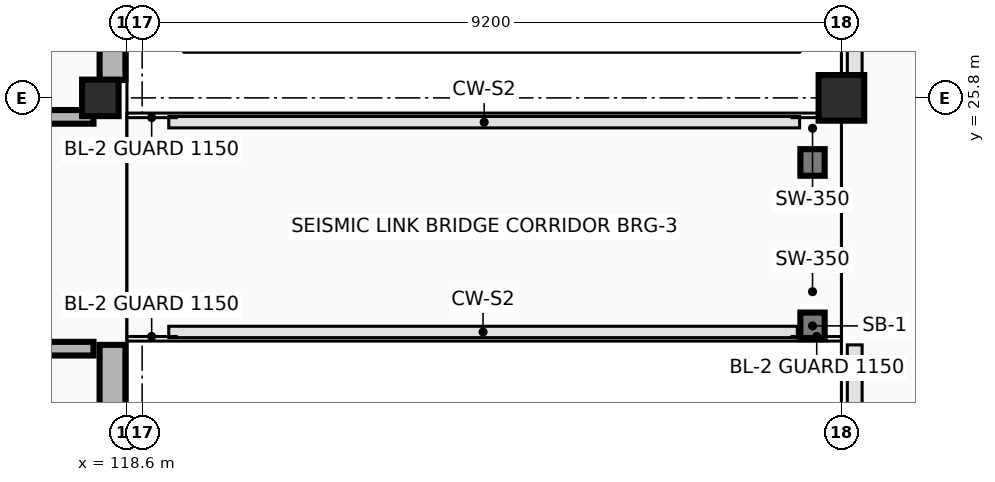
"""IFC4 building model, lengths in metres.
Left out: names, types, materials, properties, quantities, classifications, styles, units other than length and angle.
Written with IfcOpenShell. Run it as: python <this file> out.ifc"""

import sys

from ifc_helpers import new_model, si_unit, direction, frame, frame_2d, origin, origin_2d, place, context, subcontext, project, spatial, rectangle, extrude, element, save


model = new_model("IFC4")
c1 = context("Model", 3, precision=1e-05, world=origin(), true_north=direction((0.0, 1.0)))
c2 = subcontext(c1, "Body", "Model", "MODEL_VIEW")
j1 = project(units=[si_unit("LENGTHUNIT", "METRE"), si_unit("PLANEANGLEUNIT", "RADIAN")], contexts=[c1])
p1 = place(None, origin())
s1 = spatial("IfcSite", under=j1, at=p1, CompositionType="ELEMENT")
p2 = place(p1, origin())
s2 = spatial("IfcBuilding", under=s1, at=p2, CompositionType="ELEMENT")
p3 = place(p2, frame((0.0, 0.0, 9.6)))
s3 = spatial("IfcBuildingStorey", under=s2, at=p3, CompositionType="ELEMENT", Elevation=9.6)
p4 = place(p3, frame((118.25, 25.8, 0.0), z_axis=(0.0, 0.0, 1.0), x_axis=(1.0, 0.0, 0.0)))
e1 = element("IfcColumn", 1, at=p4, inside=s3, PredefinedType="COLUMN", context=c2, shape_type="SweptSolid", body=[
    extrude(rectangle(XDim=0.48, YDim=0.48, at=origin_2d()), origin(), (0.0, 0.0, 1.0), 4.2),
])
p5 = place(p3, frame((128.0, 25.8, 0.0), z_axis=(0.0, 0.0, 1.0), x_axis=(1.0, 0.0, 0.0)))
e2 = element("IfcColumn", 2, at=p5, inside=s3, PredefinedType="COLUMN", context=c2, shape_type="SweptSolid", body=[
    extrude(rectangle(XDim=0.6, YDim=0.6, at=origin_2d()), origin(), (0.0, 0.0, 1.0), 4.2),
])
for number, where, z_axis, x_axis in (
    (3, (127.46, 22.8, 0.0), (0.0, 0.0, 1.0), (1.0, 0.0, 0.0)),
    (4, (127.46, 24.95, 0.0), (0.0, 0.0, 1.0), (1.0, 0.0, 0.0)),
):
    element("IfcWall", number, at=place(p3, frame(where, z_axis=z_axis, x_axis=x_axis)), inside=s3, PredefinedType="SHEAR", context=c2, shape_type="SweptSolid", body=[
        extrude(rectangle(XDim=0.32, YDim=0.35, at=frame_2d((0.16, 0.0))), origin(), (0.0, 0.0, 1.0), 2.323),
    ])
p6 = place(p3, frame((118.41, 17.435, 0.0), z_axis=(0.0, 0.0, 1.0), x_axis=(0.0, 1.0, 0.0)))
e5 = element("IfcWall", 5, at=p6, inside=s3, PredefinedType="STANDARD", context=c2, shape_type="SweptSolid", body=[
    extrude(rectangle(XDim=5.115, YDim=0.34, at=frame_2d((2.558, 0.0))), origin(), (0.0, 0.0, 1.0), 3.365),
])
p7 = place(p3, frame((118.41, 26.035, 0.0), z_axis=(0.0, 0.0, 1.0), x_axis=(0.0, 1.0, 0.0)))
e6 = element("IfcWall", 6, at=p7, inside=s3, PredefinedType="STANDARD", context=c2, shape_type="SweptSolid", body=[
    extrude(rectangle(XDim=7.96, YDim=0.34, at=frame_2d((3.98, 0.0))), origin(), (0.0, 0.0, 1.0), 3.365),
])
p8 = place(p3, frame((111.405, 22.5, 0.0), z_axis=(0.0, 0.0, 1.0), x_axis=(1.0, 0.0, 0.0)))
e7 = element("IfcWall", 7, at=p8, inside=s3, PredefinedType="PARTITIONING", context=c2, shape_type="SweptSolid", body=[
    extrude(rectangle(XDim=6.755, YDim=0.18, at=frame_2d((3.377, 0.0))), origin(), (0.0, 0.0, 1.0), 3.92),
])
p9 = place(p8, frame((2.688, 0.0, 0.0)))
e8 = element("IfcOpeningElement", 8, at=p9, cuts=e7, PredefinedType="OPENING", context=c2, shape_type="SweptSolid", body=[
    extrude(rectangle(XDim=1.38, YDim=2.25, at=frame_2d((0.69, 1.125))), frame((0.0, 0.1, 0.0), z_axis=(0.0, -1.0, 0.0), x_axis=(1.0, 0.0, 0.0)), (0.0, 0.0, 1.0), 0.2),
])
p10 = place(p3, frame((118.16, 25.55, 0.0), z_axis=(0.0, 0.0, 1.0), x_axis=(-1.0, 0.0, 0.0)))
e9 = element("IfcWall", 9, at=p10, inside=s3, PredefinedType="PARTITIONING", context=c2, shape_type="SweptSolid", body=[
    extrude(rectangle(XDim=7.272, YDim=0.18, at=frame_2d((3.636, 0.0))), origin(), (0.0, 0.0, 1.0), 3.255),
])
p11 = place(p10, frame((2.996, 0.0, 0.0)))
e10 = element("IfcOpeningElement", 10, at=p11, cuts=e9, PredefinedType="OPENING", context=c2, shape_type="SweptSolid", body=[
    extrude(rectangle(XDim=1.28, YDim=2.25, at=frame_2d((0.64, 1.125))), frame((0.0, 0.1, 0.0), z_axis=(0.0, -1.0, 0.0), x_axis=(1.0, 0.0, 0.0)), (0.0, 0.0, 1.0), 0.2),
])
save(model, sys.argv[1])
